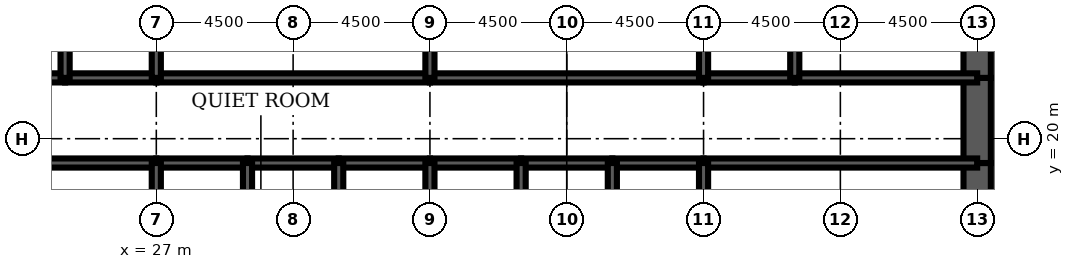
"""IFC4 building model, lengths in metres.
Left out: names, types, materials, properties, quantities, classifications, styles, units other than length and angle.
Written with IfcOpenShell. Run it as: python <this file> out.ifc"""

import sys

from ifc_helpers import new_model, si_unit, direction, frame, frame_2d, origin, place, context, subcontext, project, spatial, rectangle, extrude, element, fill, save


model = new_model("IFC4")
c1 = context("Model", 3, precision=1e-05, world=origin(), true_north=direction((0.0, 1.0)))
c2 = subcontext(c1, "Body", "Model", "MODEL_VIEW")
j1 = project(units=[si_unit("LENGTHUNIT", "METRE"), si_unit("PLANEANGLEUNIT", "RADIAN")], contexts=[c1])
p1 = place(None, origin())
s1 = spatial("IfcSite", under=j1, at=p1, CompositionType="ELEMENT")
p2 = place(p1, origin())
s2 = spatial("IfcBuilding", under=s1, at=p2, CompositionType="ELEMENT")
p3 = place(p2, frame((0.0, 0.0, 117.3)))
s3 = spatial("IfcBuildingStorey", under=s2, at=p3, CompositionType="ELEMENT", Elevation=117.3)
p4 = place(p3, frame((54.0, 16.0, 0.0), z_axis=(0.0, 0.0, 1.0), x_axis=(0.0, 1.0, 0.0)))
e1 = element("IfcWall", 1, at=p4, inside=s3, PredefinedType="SHEAR", context=c2, shape_type="SweptSolid", body=[
    extrude(rectangle(XDim=3.2, YDim=0.9, at=frame_2d((1.6, 0.0))), origin(), (0.0, 0.0, 1.0), 4.2),
])
p5 = place(p3, frame((54.0, 19.2, 0.0), z_axis=(0.0, 0.0, 1.0), x_axis=(0.0, 1.0, 0.0)))
e2 = element("IfcWall", 2, at=p5, inside=s3, PredefinedType="SHEAR", context=c2, shape_type="SweptSolid", body=[
    extrude(rectangle(XDim=2.8, YDim=0.9, at=frame_2d((1.4, 0.0))), origin(), (0.0, 0.0, 1.0), 4.2),
])
p6 = place(p5, frame((0.4, 0.0, 0.0)))
e3 = element("IfcOpeningElement", 3, at=p6, cuts=e2, PredefinedType="OPENING", context=c2, shape_type="SweptSolid", body=[
    extrude(rectangle(XDim=1.8, YDim=2.1, at=frame_2d((0.9, 1.05))), frame((0.0, 0.46, 0.0), z_axis=(0.0, -1.0, 0.0), x_axis=(1.0, 0.0, 0.0)), (0.0, 0.0, 1.0), 0.92),
])
p7 = place(p3, frame((54.0, 22.0, 0.0), z_axis=(0.0, 0.0, 1.0), x_axis=(0.0, 1.0, 0.0)))
e4 = element("IfcWall", 4, at=p7, inside=s3, PredefinedType="SHEAR", context=c2, shape_type="SweptSolid", body=[
    extrude(rectangle(XDim=4.0, YDim=0.9, at=frame_2d((2.0, 0.0))), origin(), (0.0, 0.0, 1.0), 4.2),
])
p8 = place(p3, frame((18.0, 19.2, 0.0), z_axis=(0.0, 0.0, 1.0), x_axis=(1.0, 0.0, 0.0)))
e5 = element("IfcWall", 5, at=p8, inside=s3, PredefinedType="SOLIDWALL", context=c2, shape_type="SweptSolid", body=[
    extrude(rectangle(XDim=9.0, YDim=0.3, at=frame_2d((4.5, 0.0))), origin(), (0.0, 0.0, 1.0), 4.2),
])
p9 = place(p8, frame((0.65, 0.0, 0.0)))
e6 = element("IfcOpeningElement", 6, at=p9, cuts=e5, PredefinedType="OPENING", context=c2, shape_type="SweptSolid", body=[
    extrude(rectangle(XDim=1.0, YDim=2.1, at=frame_2d((0.5, 1.05))), frame((0.0, 0.16, 0.0), z_axis=(0.0, -1.0, 0.0), x_axis=(1.0, 0.0, 0.0)), (0.0, 0.0, 1.0), 0.32),
])
p10 = place(p3, frame((27.0, 19.2, 0.0), z_axis=(0.0, 0.0, 1.0), x_axis=(1.0, 0.0, 0.0)))
e7 = element("IfcWall", 7, at=p10, inside=s3, PredefinedType="SOLIDWALL", context=c2, shape_type="SweptSolid", body=[
    extrude(rectangle(XDim=3.0, YDim=0.3, at=frame_2d((1.5, 0.0))), origin(), (0.0, 0.0, 1.0), 4.2),
])
p11 = place(p10, frame((0.95, 0.0, 0.0)))
e8 = element("IfcOpeningElement", 8, at=p11, cuts=e7, PredefinedType="OPENING", context=c2, shape_type="SweptSolid", body=[
    extrude(rectangle(XDim=1.1, YDim=2.2, at=frame_2d((0.55, 1.1))), frame((0.0, 0.16, 0.0), z_axis=(0.0, -1.0, 0.0), x_axis=(1.0, 0.0, 0.0)), (0.0, 0.0, 1.0), 0.32),
])
p12 = place(p3, frame((30.0, 19.2, 0.0), z_axis=(0.0, 0.0, 1.0), x_axis=(1.0, 0.0, 0.0)))
e9 = element("IfcWall", 9, at=p12, inside=s3, PredefinedType="SOLIDWALL", context=c2, shape_type="SweptSolid", body=[
    extrude(rectangle(XDim=3.0, YDim=0.3, at=frame_2d((1.5, 0.0))), origin(), (0.0, 0.0, 1.0), 4.2),
])
p13 = place(p12, frame((0.95, 0.0, 0.0)))
e10 = element("IfcOpeningElement", 10, at=p13, cuts=e9, PredefinedType="OPENING", context=c2, shape_type="SweptSolid", body=[
    extrude(rectangle(XDim=1.1, YDim=2.2, at=frame_2d((0.55, 1.1))), frame((0.0, 0.16, 0.0), z_axis=(0.0, -1.0, 0.0), x_axis=(1.0, 0.0, 0.0)), (0.0, 0.0, 1.0), 0.32),
])
p14 = place(p3, frame((33.0, 19.2, 0.0), z_axis=(0.0, 0.0, 1.0), x_axis=(1.0, 0.0, 0.0)))
e11 = element("IfcWall", 11, at=p14, inside=s3, PredefinedType="SOLIDWALL", context=c2, shape_type="SweptSolid", body=[
    extrude(rectangle(XDim=3.0, YDim=0.3, at=frame_2d((1.5, 0.0))), origin(), (0.0, 0.0, 1.0), 4.2),
])
p15 = place(p14, frame((0.95, 0.0, 0.0)))
e12 = element("IfcOpeningElement", 12, at=p15, cuts=e11, PredefinedType="OPENING", context=c2, shape_type="SweptSolid", body=[
    extrude(rectangle(XDim=1.1, YDim=2.2, at=frame_2d((0.55, 1.1))), frame((0.0, 0.16, 0.0), z_axis=(0.0, -1.0, 0.0), x_axis=(1.0, 0.0, 0.0)), (0.0, 0.0, 1.0), 0.32),
])
p16 = place(p3, frame((36.0, 19.2, 0.0), z_axis=(0.0, 0.0, 1.0), x_axis=(1.0, 0.0, 0.0)))
e13 = element("IfcWall", 13, at=p16, inside=s3, PredefinedType="SOLIDWALL", context=c2, shape_type="SweptSolid", body=[
    extrude(rectangle(XDim=3.0, YDim=0.3, at=frame_2d((1.5, 0.0))), origin(), (0.0, 0.0, 1.0), 4.2),
])
p17 = place(p16, frame((0.95, 0.0, 0.0)))
e14 = element("IfcOpeningElement", 14, at=p17, cuts=e13, PredefinedType="OPENING", context=c2, shape_type="SweptSolid", body=[
    extrude(rectangle(XDim=1.1, YDim=2.2, at=frame_2d((0.55, 1.1))), frame((0.0, 0.16, 0.0), z_axis=(0.0, -1.0, 0.0), x_axis=(1.0, 0.0, 0.0)), (0.0, 0.0, 1.0), 0.32),
])
p18 = place(p3, frame((39.0, 19.2, 0.0), z_axis=(0.0, 0.0, 1.0), x_axis=(1.0, 0.0, 0.0)))
e15 = element("IfcWall", 15, at=p18, inside=s3, PredefinedType="SOLIDWALL", context=c2, shape_type="SweptSolid", body=[
    extrude(rectangle(XDim=3.0, YDim=0.3, at=frame_2d((1.5, 0.0))), origin(), (0.0, 0.0, 1.0), 4.2),
])
p19 = place(p18, frame((1.0, 0.0, 0.0)))
e16 = element("IfcOpeningElement", 16, at=p19, cuts=e15, PredefinedType="OPENING", context=c2, shape_type="SweptSolid", body=[
    extrude(rectangle(XDim=1.0, YDim=2.1, at=frame_2d((0.5, 1.05))), frame((0.0, 0.16, 0.0), z_axis=(0.0, -1.0, 0.0), x_axis=(1.0, 0.0, 0.0)), (0.0, 0.0, 1.0), 0.32),
])
p20 = place(p3, frame((42.0, 19.2, 0.0), z_axis=(0.0, 0.0, 1.0), x_axis=(1.0, 0.0, 0.0)))
e17 = element("IfcWall", 17, at=p20, inside=s3, PredefinedType="SOLIDWALL", context=c2, shape_type="SweptSolid", body=[
    extrude(rectangle(XDim=3.0, YDim=0.3, at=frame_2d((1.5, 0.0))), origin(), (0.0, 0.0, 1.0), 4.2),
])
p21 = place(p3, frame((45.0, 19.2, 0.0), z_axis=(0.0, 0.0, 1.0), x_axis=(1.0, 0.0, 0.0)))
e18 = element("IfcWall", 18, at=p21, inside=s3, PredefinedType="SOLIDWALL", context=c2, shape_type="SweptSolid", body=[
    extrude(rectangle(XDim=9.0, YDim=0.3, at=frame_2d((4.5, 0.0))), origin(), (0.0, 0.0, 1.0), 4.2),
])
p22 = place(p21, frame((7.35, 0.0, 0.0)))
e19 = element("IfcOpeningElement", 19, at=p22, cuts=e18, PredefinedType="OPENING", context=c2, shape_type="SweptSolid", body=[
    extrude(rectangle(XDim=1.0, YDim=2.1, at=frame_2d((0.5, 1.05))), frame((0.0, 0.16, 0.0), z_axis=(0.0, -1.0, 0.0), x_axis=(1.0, 0.0, 0.0)), (0.0, 0.0, 1.0), 0.32),
])
p23 = place(p3, frame((18.0, 22.0, 0.0), z_axis=(0.0, 0.0, 1.0), x_axis=(1.0, 0.0, 0.0)))
e20 = element("IfcWall", 20, at=p23, inside=s3, PredefinedType="SOLIDWALL", context=c2, shape_type="SweptSolid", body=[
    extrude(rectangle(XDim=6.0, YDim=0.3, at=frame_2d((3.0, 0.0))), origin(), (0.0, 0.0, 1.0), 4.2),
])
p24 = place(p23, frame((2.0, 0.0, 0.0)))
e21 = element("IfcOpeningElement", 21, at=p24, cuts=e20, PredefinedType="OPENING", context=c2, shape_type="SweptSolid", body=[
    extrude(rectangle(XDim=1.0, YDim=2.1, at=frame_2d((0.5, 1.05))), frame((0.0, 0.16, 0.0), z_axis=(0.0, -1.0, 0.0), x_axis=(1.0, 0.0, 0.0)), (0.0, 0.0, 1.0), 0.32),
])
p25 = place(p3, frame((24.0, 22.0, 0.0), z_axis=(0.0, 0.0, 1.0), x_axis=(1.0, 0.0, 0.0)))
e22 = element("IfcWall", 22, at=p25, inside=s3, PredefinedType="SOLIDWALL", context=c2, shape_type="SweptSolid", body=[
    extrude(rectangle(XDim=3.0, YDim=0.3, at=frame_2d((1.5, 0.0))), origin(), (0.0, 0.0, 1.0), 4.2),
])
p26 = place(p25, frame((1.0, 0.0, 0.0)))
e23 = element("IfcOpeningElement", 23, at=p26, cuts=e22, PredefinedType="OPENING", context=c2, shape_type="SweptSolid", body=[
    extrude(rectangle(XDim=1.0, YDim=2.1, at=frame_2d((0.5, 1.05))), frame((0.0, 0.16, 0.0), z_axis=(0.0, -1.0, 0.0), x_axis=(1.0, 0.0, 0.0)), (0.0, 0.0, 1.0), 0.32),
])
p27 = place(p3, frame((27.0, 22.0, 0.0), z_axis=(0.0, 0.0, 1.0), x_axis=(1.0, 0.0, 0.0)))
e24 = element("IfcWall", 24, at=p27, inside=s3, PredefinedType="SOLIDWALL", context=c2, shape_type="SweptSolid", body=[
    extrude(rectangle(XDim=9.0, YDim=0.3, at=frame_2d((4.5, 0.0))), origin(), (0.0, 0.0, 1.0), 4.2),
])
p28 = place(p27, frame((4.0, 0.0, 0.0)))
e25 = element("IfcOpeningElement", 25, at=p28, cuts=e24, PredefinedType="OPENING", context=c2, shape_type="SweptSolid", body=[
    extrude(rectangle(XDim=1.0, YDim=2.1, at=frame_2d((0.5, 1.05))), frame((0.0, 0.16, 0.0), z_axis=(0.0, -1.0, 0.0), x_axis=(1.0, 0.0, 0.0)), (0.0, 0.0, 1.0), 0.32),
])
p29 = place(p3, frame((36.0, 22.0, 0.0), z_axis=(0.0, 0.0, 1.0), x_axis=(1.0, 0.0, 0.0)))
e26 = element("IfcWall", 26, at=p29, inside=s3, PredefinedType="SOLIDWALL", context=c2, shape_type="SweptSolid", body=[
    extrude(rectangle(XDim=9.0, YDim=0.3, at=frame_2d((4.5, 0.0))), origin(), (0.0, 0.0, 1.0), 4.2),
])
p30 = place(p29, frame((4.0, 0.0, 0.0)))
e27 = element("IfcOpeningElement", 27, at=p30, cuts=e26, PredefinedType="OPENING", context=c2, shape_type="SweptSolid", body=[
    extrude(rectangle(XDim=1.0, YDim=2.1, at=frame_2d((0.5, 1.05))), frame((0.0, 0.16, 0.0), z_axis=(0.0, -1.0, 0.0), x_axis=(1.0, 0.0, 0.0)), (0.0, 0.0, 1.0), 0.32),
])
p31 = place(p3, frame((45.0, 22.0, 0.0), z_axis=(0.0, 0.0, 1.0), x_axis=(1.0, 0.0, 0.0)))
e28 = element("IfcWall", 28, at=p31, inside=s3, PredefinedType="SOLIDWALL", context=c2, shape_type="SweptSolid", body=[
    extrude(rectangle(XDim=3.0, YDim=0.3, at=frame_2d((1.5, 0.0))), origin(), (0.0, 0.0, 1.0), 4.2),
])
p32 = place(p31, frame((1.0, 0.0, 0.0)))
e29 = element("IfcOpeningElement", 29, at=p32, cuts=e28, PredefinedType="OPENING", context=c2, shape_type="SweptSolid", body=[
    extrude(rectangle(XDim=1.0, YDim=2.1, at=frame_2d((0.5, 1.05))), frame((0.0, 0.16, 0.0), z_axis=(0.0, -1.0, 0.0), x_axis=(1.0, 0.0, 0.0)), (0.0, 0.0, 1.0), 0.32),
])
p33 = place(p3, frame((48.0, 22.0, 0.0), z_axis=(0.0, 0.0, 1.0), x_axis=(1.0, 0.0, 0.0)))
e30 = element("IfcWall", 30, at=p33, inside=s3, PredefinedType="SOLIDWALL", context=c2, shape_type="SweptSolid", body=[
    extrude(rectangle(XDim=6.0, YDim=0.3, at=frame_2d((3.0, 0.0))), origin(), (0.0, 0.0, 1.0), 4.2),
])
p34 = place(p33, frame((2.0, 0.0, 0.0)))
e31 = element("IfcOpeningElement", 31, at=p34, cuts=e30, PredefinedType="OPENING", context=c2, shape_type="SweptSolid", body=[
    extrude(rectangle(XDim=1.0, YDim=2.1, at=frame_2d((0.5, 1.05))), frame((0.0, 0.16, 0.0), z_axis=(0.0, -1.0, 0.0), x_axis=(1.0, 0.0, 0.0)), (0.0, 0.0, 1.0), 0.32),
])
p35 = place(p33, frame((4.0, 0.0, 0.0)))
e32 = element("IfcOpeningElement", 32, at=p35, cuts=e30, PredefinedType="OPENING", context=c2, shape_type="SweptSolid", body=[
    extrude(rectangle(XDim=1.0, YDim=2.1, at=frame_2d((0.5, 1.05))), frame((0.0, 0.16, 0.0), z_axis=(0.0, -1.0, 0.0), x_axis=(1.0, 0.0, 0.0)), (0.0, 0.0, 1.0), 0.32),
])
for number, where, z_axis, x_axis in (
    (33, (27.0, 16.0, 0.0), (0.0, 0.0, 1.0), (0.0, 1.0, 0.0)),
    (34, (30.0, 16.0, 0.0), (0.0, 0.0, 1.0), (0.0, 1.0, 0.0)),
    (35, (33.0, 16.0, 0.0), (0.0, 0.0, 1.0), (0.0, 1.0, 0.0)),
    (36, (36.0, 16.0, 0.0), (0.0, 0.0, 1.0), (0.0, 1.0, 0.0)),
    (37, (39.0, 16.0, 0.0), (0.0, 0.0, 1.0), (0.0, 1.0, 0.0)),
    (38, (42.0, 16.0, 0.0), (0.0, 0.0, 1.0), (0.0, 1.0, 0.0)),
    (39, (45.0, 16.0, 0.0), (0.0, 0.0, 1.0), (0.0, 1.0, 0.0)),
):
    element("IfcWall", number, at=place(p3, frame(where, z_axis=z_axis, x_axis=x_axis)), inside=s3, PredefinedType="SOLIDWALL", context=c2, shape_type="SweptSolid", body=[
        extrude(rectangle(XDim=3.2, YDim=0.3, at=frame_2d((1.6, 0.0))), origin(), (0.0, 0.0, 1.0), 4.2),
    ])
for number, where, z_axis, x_axis in (
    (40, (24.0, 22.0, 0.0), (0.0, 0.0, 1.0), (0.0, 1.0, 0.0)),
    (41, (27.0, 22.0, 0.0), (0.0, 0.0, 1.0), (0.0, 1.0, 0.0)),
    (42, (36.0, 22.0, 0.0), (0.0, 0.0, 1.0), (0.0, 1.0, 0.0)),
    (43, (45.0, 22.0, 0.0), (0.0, 0.0, 1.0), (0.0, 1.0, 0.0)),
    (44, (48.0, 22.0, 0.0), (0.0, 0.0, 1.0), (0.0, 1.0, 0.0)),
):
    element("IfcWall", number, at=place(p3, frame(where, z_axis=z_axis, x_axis=x_axis)), inside=s3, PredefinedType="SOLIDWALL", context=c2, shape_type="SweptSolid", body=[
        extrude(rectangle(XDim=4.0, YDim=0.3, at=frame_2d((2.0, 0.0))), origin(), (0.0, 0.0, 1.0), 4.2),
    ])
p36 = place(p3, frame((38.5, 22.15, 0.0), z_axis=(0.0, 0.0, 1.0), x_axis=(0.0, 1.0, 0.0)))
e45 = element("IfcWall", 45, at=p36, inside=s3, PredefinedType="PARTITIONING", context=c2, shape_type="SweptSolid", body=[
    extrude(rectangle(XDim=3.7, YDim=0.15, at=frame_2d((1.85, 0.0))), origin(), (0.0, 0.0, 1.0), 3.0),
])
p37 = place(p36, frame((2.2, 0.0, 0.0)))
e46 = element("IfcOpeningElement", 46, at=p37, cuts=e45, PredefinedType="OPENING", context=c2, shape_type="SweptSolid", body=[
    extrude(rectangle(XDim=1.0, YDim=2.1, at=frame_2d((0.5, 1.05))), frame((0.0, 0.085, 0.0), z_axis=(0.0, -1.0, 0.0), x_axis=(1.0, 0.0, 0.0)), (0.0, 0.0, 1.0), 0.17),
])
p38 = place(p3, frame((51.375, 22.15, 0.0), z_axis=(0.0, 0.0, 1.0), x_axis=(0.0, 1.0, 0.0)))
e47 = element("IfcWall", 47, at=p38, inside=s3, PredefinedType="PARTITIONING", context=c2, shape_type="SweptSolid", body=[
    extrude(rectangle(XDim=3.7, YDim=0.15, at=frame_2d((1.85, 0.0))), origin(), (0.0, 0.0, 1.0), 3.0),
])
p39 = place(p3, frame((24.5, 19.35, 0.0), z_axis=(0.0, 0.0, 1.0), x_axis=(0.0, 1.0, 0.0)))
e48 = element("IfcWall", 48, at=p39, inside=s3, PredefinedType="PARTITIONING", context=c2, shape_type="SweptSolid", body=[
    extrude(rectangle(XDim=2.5, YDim=0.15, at=frame_2d((1.25, 0.0))), origin(), (0.0, 0.0, 1.0), 3.0),
])
p40 = place(p39, frame((1.15, 0.0, 0.0)))
e49 = element("IfcOpeningElement", 49, at=p40, cuts=e48, PredefinedType="OPENING", context=c2, shape_type="SweptSolid", body=[
    extrude(rectangle(XDim=1.0, YDim=2.1, at=frame_2d((0.5, 1.05))), frame((0.0, 0.085, 0.0), z_axis=(0.0, -1.0, 0.0), x_axis=(1.0, 0.0, 0.0)), (0.0, 0.0, 1.0), 0.17),
])
p41 = place(p40, origin())
e50 = element("IfcDoor", 50, at=p41, inside=s3, OperationType="SINGLE_SWING_RIGHT", PredefinedType="DOOR", context=c2, shape_type="SweptSolid", body=[
    extrude(rectangle(XDim=1.0, YDim=2.1, at=frame_2d((0.5, 1.05))), frame((0.0, 0.025, 0.0), z_axis=(0.0, -1.0, 0.0), x_axis=(1.0, 0.0, 0.0)), (0.0, 0.0, 1.0), 0.05),
])
fill(e49, e50)
p42 = place(p11, origin())
e51 = element("IfcDoor", 51, at=p42, inside=s3, OperationType="DOUBLE_DOOR_SLIDING", PredefinedType="USERDEFINED", context=c2, shape_type="SweptSolid", body=[
    extrude(rectangle(XDim=1.1, YDim=2.2, at=frame_2d((0.55, 1.1))), frame((0.0, 0.025, 0.0), z_axis=(0.0, -1.0, 0.0), x_axis=(1.0, 0.0, 0.0)), (0.0, 0.0, 1.0), 0.05),
])
fill(e8, e51)
p43 = place(p13, origin())
e52 = element("IfcDoor", 52, at=p43, inside=s3, OperationType="DOUBLE_DOOR_SLIDING", PredefinedType="USERDEFINED", context=c2, shape_type="SweptSolid", body=[
    extrude(rectangle(XDim=1.1, YDim=2.2, at=frame_2d((0.55, 1.1))), frame((0.0, 0.025, 0.0), z_axis=(0.0, -1.0, 0.0), x_axis=(1.0, 0.0, 0.0)), (0.0, 0.0, 1.0), 0.05),
])
fill(e10, e52)
p44 = place(p15, origin())
e53 = element("IfcDoor", 53, at=p44, inside=s3, OperationType="DOUBLE_DOOR_SLIDING", PredefinedType="USERDEFINED", context=c2, shape_type="SweptSolid", body=[
    extrude(rectangle(XDim=1.1, YDim=2.2, at=frame_2d((0.55, 1.1))), frame((0.0, 0.025, 0.0), z_axis=(0.0, -1.0, 0.0), x_axis=(1.0, 0.0, 0.0)), (0.0, 0.0, 1.0), 0.05),
])
fill(e12, e53)
p45 = place(p17, origin())
e54 = element("IfcDoor", 54, at=p45, inside=s3, OperationType="DOUBLE_DOOR_SLIDING", PredefinedType="USERDEFINED", context=c2, shape_type="SweptSolid", body=[
    extrude(rectangle(XDim=1.1, YDim=2.2, at=frame_2d((0.55, 1.1))), frame((0.0, 0.025, 0.0), z_axis=(0.0, -1.0, 0.0), x_axis=(1.0, 0.0, 0.0)), (0.0, 0.0, 1.0), 0.05),
])
fill(e14, e54)
p46 = place(p22, origin())
e55 = element("IfcDoor", 55, at=p46, inside=s3, OperationType="SINGLE_SWING_RIGHT", PredefinedType="DOOR", context=c2, shape_type="SweptSolid", body=[
    extrude(rectangle(XDim=1.0, YDim=2.1, at=frame_2d((0.5, 1.05))), frame((0.0, 0.025, 0.0), z_axis=(0.0, -1.0, 0.0), x_axis=(1.0, 0.0, 0.0)), (0.0, 0.0, 1.0), 0.05),
])
fill(e19, e55)
p47 = place(p6, origin())
e56 = element("IfcDoor", 56, at=p47, inside=s3, OperationType="SINGLE_SWING_LEFT", PredefinedType="DOOR", context=c2, shape_type="SweptSolid", body=[
    extrude(rectangle(XDim=1.8, YDim=2.1, at=frame_2d((0.9, 1.05))), frame((0.0, 0.45, 0.0), z_axis=(0.0, -1.0, 0.0), x_axis=(1.0, 0.0, 0.0)), (0.0, 0.0, 1.0), 0.899),
])
fill(e3, e56)
p48 = place(p26, origin())
e57 = element("IfcDoor", 57, at=p48, inside=s3, OperationType="SINGLE_SWING_LEFT", PredefinedType="DOOR", context=c2, shape_type="SweptSolid", body=[
    extrude(rectangle(XDim=1.0, YDim=2.1, at=frame_2d((0.5, 1.05))), frame((0.0, 0.025, 0.0), z_axis=(0.0, -1.0, 0.0), x_axis=(1.0, 0.0, 0.0)), (0.0, 0.0, 1.0), 0.05),
])
fill(e23, e57)
p49 = place(p28, origin())
e58 = element("IfcDoor", 58, at=p49, inside=s3, OperationType="SINGLE_SWING_LEFT", PredefinedType="DOOR", context=c2, shape_type="SweptSolid", body=[
    extrude(rectangle(XDim=1.0, YDim=2.1, at=frame_2d((0.5, 1.05))), frame((0.0, 0.025, 0.0), z_axis=(0.0, -1.0, 0.0), x_axis=(1.0, 0.0, 0.0)), (0.0, 0.0, 1.0), 0.05),
])
fill(e25, e58)
p50 = place(p30, origin())
e59 = element("IfcDoor", 59, at=p50, inside=s3, OperationType="SINGLE_SWING_LEFT", PredefinedType="DOOR", context=c2, shape_type="SweptSolid", body=[
    extrude(rectangle(XDim=1.0, YDim=2.1, at=frame_2d((0.5, 1.05))), frame((0.0, 0.025, 0.0), z_axis=(0.0, -1.0, 0.0), x_axis=(1.0, 0.0, 0.0)), (0.0, 0.0, 1.0), 0.05),
])
fill(e27, e59)
p51 = place(p32, origin())
e60 = element("IfcDoor", 60, at=p51, inside=s3, OperationType="SINGLE_SWING_LEFT", PredefinedType="DOOR", context=c2, shape_type="SweptSolid", body=[
    extrude(rectangle(XDim=1.0, YDim=2.1, at=frame_2d((0.5, 1.05))), frame((0.0, 0.025, 0.0), z_axis=(0.0, -1.0, 0.0), x_axis=(1.0, 0.0, 0.0)), (0.0, 0.0, 1.0), 0.05),
])
fill(e29, e60)
p52 = place(p34, origin())
e61 = element("IfcDoor", 61, at=p52, inside=s3, OperationType="SINGLE_SWING_LEFT", PredefinedType="DOOR", context=c2, shape_type="SweptSolid", body=[
    extrude(rectangle(XDim=1.0, YDim=2.1, at=frame_2d((0.5, 1.05))), frame((0.0, 0.025, 0.0), z_axis=(0.0, -1.0, 0.0), x_axis=(1.0, 0.0, 0.0)), (0.0, 0.0, 1.0), 0.05),
])
fill(e31, e61)
p53 = place(p35, origin())
e62 = element("IfcDoor", 62, at=p53, inside=s3, OperationType="SINGLE_SWING_RIGHT", PredefinedType="DOOR", context=c2, shape_type="SweptSolid", body=[
    extrude(rectangle(XDim=1.0, YDim=2.1, at=frame_2d((0.5, 1.05))), frame((0.0, 0.025, 0.0), z_axis=(0.0, -1.0, 0.0), x_axis=(1.0, 0.0, 0.0)), (0.0, 0.0, 1.0), 0.05),
])
fill(e32, e62)
p54 = place(p19, origin())
e63 = element("IfcDoor", 63, at=p54, inside=s3, OperationType="SINGLE_SWING_LEFT", PredefinedType="DOOR", context=c2, shape_type="SweptSolid", body=[
    extrude(rectangle(XDim=1.0, YDim=2.1, at=frame_2d((0.5, 1.05))), frame((0.0, 0.025, 0.0), z_axis=(0.0, -1.0, 0.0), x_axis=(1.0, 0.0, 0.0)), (0.0, 0.0, 1.0), 0.05),
])
fill(e16, e63)
save(model, sys.argv[1])
